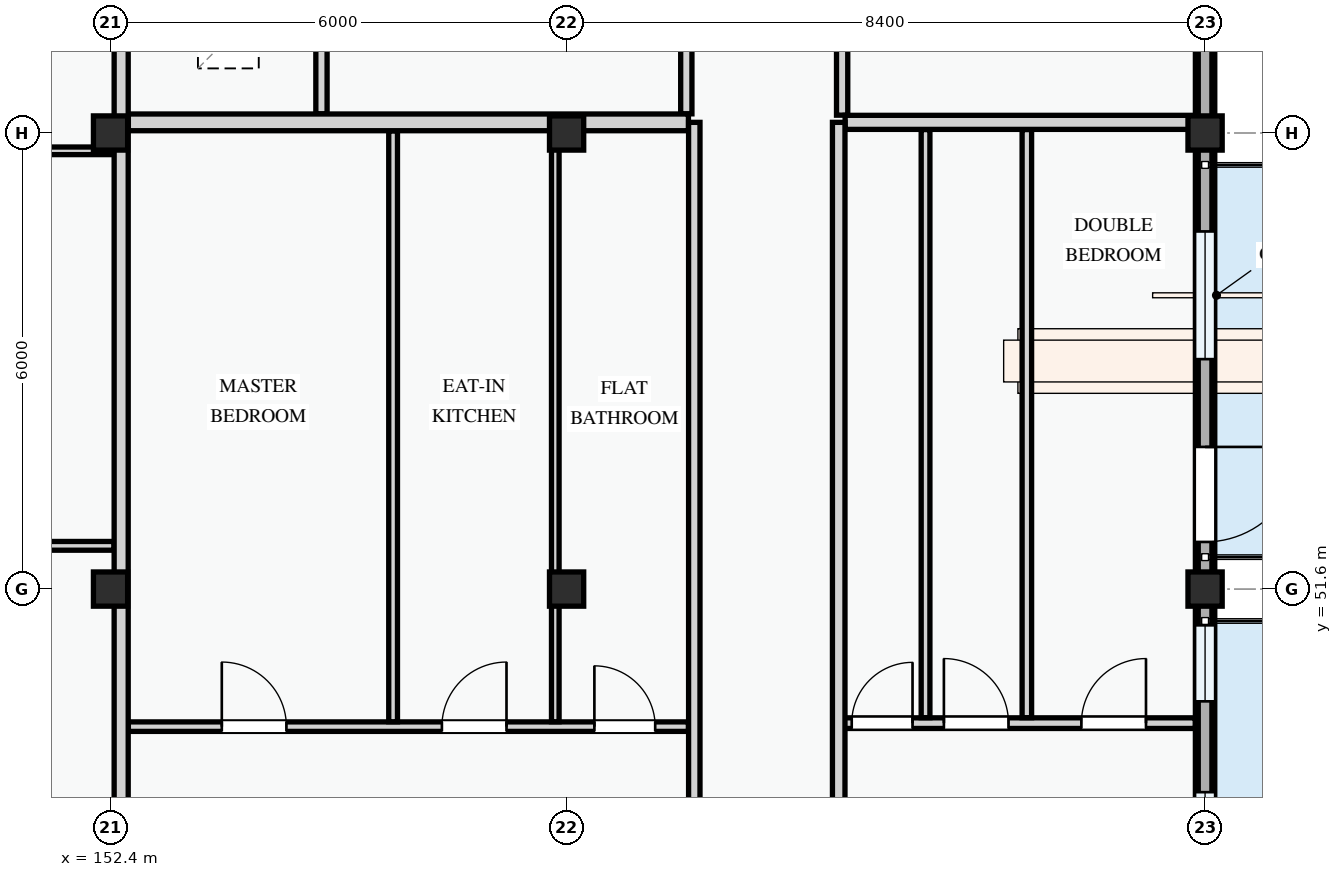
"""IFC4 building model, lengths in metres.
Left out: names, types, materials, properties, quantities, classifications, styles, units other than length and angle.
Written with IfcOpenShell. Run it as: python <this file> out.ifc"""

import sys

from ifc_helpers import new_model, si_unit, direction, frame, frame_2d, origin, origin_2d, place, context, subcontext, project, spatial, polyline, rectangle, outline, extrude, element, fill, save


model = new_model("IFC4")
c1 = context("Model", 3, precision=1e-05, world=origin(), true_north=direction((0.0, 1.0)))
c2 = subcontext(c1, "Body", "Model", "MODEL_VIEW")
j1 = project(units=[si_unit("LENGTHUNIT", "METRE"), si_unit("PLANEANGLEUNIT", "RADIAN")], contexts=[c1])
p1 = place(None, origin())
s1 = spatial("IfcSite", under=j1, at=p1, CompositionType="ELEMENT")
p2 = place(p1, origin())
s2 = spatial("IfcBuilding", under=s1, at=p2, CompositionType="ELEMENT")
p3 = place(p2, frame((0.0, 0.0, 27.9)))
s3 = spatial("IfcBuildingStorey", under=s2, at=p3, CompositionType="ELEMENT", Elevation=27.9)
for number, where, z_axis, x_axis in (
    (1, (152.4, 51.6, 0.0), (0.0, 0.0, 1.0), (1.0, 0.0, 0.0)),
    (2, (152.4, 57.6, 0.0), (0.0, 0.0, 1.0), (1.0, 0.0, 0.0)),
    (3, (158.4, 51.6, 0.0), (0.0, 0.0, 1.0), (1.0, 0.0, 0.0)),
    (4, (158.4, 57.6, 0.0), (0.0, 0.0, 1.0), (1.0, 0.0, 0.0)),
    (5, (166.8, 51.6, 0.0), (0.0, 0.0, 1.0), (1.0, 0.0, 0.0)),
    (6, (166.8, 57.6, 0.0), (0.0, 0.0, 1.0), (1.0, 0.0, 0.0)),
):
    element("IfcColumn", number, at=place(p3, frame(where, z_axis=z_axis, x_axis=x_axis)), inside=s3, PredefinedType="COLUMN", context=c2, shape_type="SweptSolid", body=[
        extrude(rectangle(XDim=0.45, YDim=0.45, at=origin_2d()), origin(), (0.0, 0.0, 1.0), 3.3),
    ])
p4 = place(p3, frame((166.8, 43.2, 0.0), z_axis=(0.0, 0.0, 1.0), x_axis=(0.0, 1.0, 0.0)))
e7 = element("IfcWall", 7, at=p4, inside=s3, PredefinedType="STANDARD", context=c2, shape_type="SweptSolid", body=[
    extrude(rectangle(XDim=8.4, YDim=0.255, at=frame_2d((4.2, 0.0))), origin(), (0.0, 0.0, 1.0), 2.345),
])
p5 = place(p4, frame((2.17, 0.0, 0.0)))
e8 = element("IfcOpeningElement", 8, at=p5, cuts=e7, PredefinedType="OPENING", context=c2, shape_type="SweptSolid", body=[
    extrude(rectangle(XDim=1.2, YDim=2.15, at=frame_2d((0.6, 1.075))), frame((0.0, 0.137, 0.0), z_axis=(0.0, -1.0, 0.0), x_axis=(1.0, 0.0, 0.0)), (0.0, 0.0, 1.0), 0.275),
])
p6 = place(p4, frame((0.565, 0.0, 0.78)))
e9 = element("IfcOpeningElement", 9, at=p6, cuts=e7, PredefinedType="OPENING", context=c2, shape_type="SweptSolid", body=[
    extrude(rectangle(XDim=0.9, YDim=1.2, at=frame_2d((0.45, 0.6))), frame((0.0, 0.137, 0.0), z_axis=(0.0, -1.0, 0.0), x_axis=(1.0, 0.0, 0.0)), (0.0, 0.0, 1.0), 0.275),
])
p7 = place(p4, frame((4.328, 0.0, 0.78)))
e10 = element("IfcOpeningElement", 10, at=p7, cuts=e7, PredefinedType="OPENING", context=c2, shape_type="SweptSolid", body=[
    extrude(rectangle(XDim=1.4, YDim=1.45, at=frame_2d((0.7, 0.725))), frame((0.0, 0.137, 0.0), z_axis=(0.0, -1.0, 0.0), x_axis=(1.0, 0.0, 0.0)), (0.0, 0.0, 1.0), 0.275),
])
p8 = place(p4, frame((6.923, 0.0, 0.78)))
e11 = element("IfcOpeningElement", 11, at=p8, cuts=e7, PredefinedType="OPENING", context=c2, shape_type="SweptSolid", body=[
    extrude(rectangle(XDim=1.0, YDim=1.25, at=frame_2d((0.5, 0.625))), frame((0.0, 0.137, 0.0), z_axis=(0.0, -1.0, 0.0), x_axis=(1.0, 0.0, 0.0)), (0.0, 0.0, 1.0), 0.275),
])
p9 = place(p3, frame((166.8, 51.6, 0.0), z_axis=(0.0, 0.0, 1.0), x_axis=(0.0, 1.0, 0.0)))
e12 = element("IfcWall", 12, at=p9, inside=s3, PredefinedType="STANDARD", context=c2, shape_type="SweptSolid", body=[
    extrude(rectangle(XDim=6.0, YDim=0.255, at=frame_2d((3.0, 0.0))), origin(), (0.0, 0.0, 1.0), 2.445),
])
p10 = place(p9, frame((0.62, 0.0, 0.0)))
e13 = element("IfcOpeningElement", 13, at=p10, cuts=e12, PredefinedType="OPENING", context=c2, shape_type="SweptSolid", body=[
    extrude(rectangle(XDim=1.25, YDim=2.2, at=frame_2d((0.625, 1.1))), frame((0.0, 0.137, 0.0), z_axis=(0.0, -1.0, 0.0), x_axis=(1.0, 0.0, 0.0)), (0.0, 0.0, 1.0), 0.275),
])
p11 = place(p9, frame((3.025, 0.0, 0.78)))
e14 = element("IfcOpeningElement", 14, at=p11, cuts=e12, PredefinedType="OPENING", context=c2, shape_type="SweptSolid", body=[
    extrude(rectangle(XDim=1.68, YDim=1.46, at=frame_2d((0.84, 0.73))), frame((0.0, 0.137, 0.0), z_axis=(0.0, -1.0, 0.0), x_axis=(1.0, 0.0, 0.0)), (0.0, 0.0, 1.0), 0.275),
])
p12 = place(p3, frame((166.8, 57.6, 0.0), z_axis=(0.0, 0.0, 1.0), x_axis=(0.0, 1.0, 0.0)))
e15 = element("IfcWall", 15, at=p12, inside=s3, PredefinedType="STANDARD", context=c2, shape_type="SweptSolid", body=[
    extrude(rectangle(XDim=8.4, YDim=0.255, at=frame_2d((4.2, 0.0))), origin(), (0.0, 0.0, 1.0), 2.345),
])
p13 = place(p12, frame((1.745, 0.0, 0.78)))
e16 = element("IfcOpeningElement", 16, at=p13, cuts=e15, PredefinedType="OPENING", context=c2, shape_type="SweptSolid", body=[
    extrude(rectangle(XDim=0.9, YDim=1.2, at=frame_2d((0.45, 0.6))), frame((0.0, 0.137, 0.0), z_axis=(0.0, -1.0, 0.0), x_axis=(1.0, 0.0, 0.0)), (0.0, 0.0, 1.0), 0.275),
])
p14 = place(p12, frame((5.188, 0.0, 0.78)))
e17 = element("IfcOpeningElement", 17, at=p14, cuts=e15, PredefinedType="OPENING", context=c2, shape_type="SweptSolid", body=[
    extrude(rectangle(XDim=0.95, YDim=1.15, at=frame_2d((0.475, 0.575))), frame((0.0, 0.137, 0.0), z_axis=(0.0, -1.0, 0.0), x_axis=(1.0, 0.0, 0.0)), (0.0, 0.0, 1.0), 0.275),
])
p15 = place(p3, frame((166.8, 43.2, 3.3), z_axis=(0.0, 0.0, 1.0), x_axis=(0.0, 1.0, 0.0)))
e18 = element("IfcWall", 18, at=p15, inside=s3, PredefinedType="PARAPET", context=c2, shape_type="SweptSolid", body=[
    extrude(outline(polyline([(0.0, 0.0), (8.4, 0.0), (8.4, 1.12), (7.7, 1.322), (7.0, 1.484), (6.3, 1.618), (5.6, 1.718), (4.9, 1.779), (4.2, 1.8), (3.5, 1.779), (2.8, 1.718), (2.1, 1.618), (1.4, 1.484), (0.7, 1.322), (0.0, 1.12), (0.0, 0.0)])), frame((0.0, 0.09, 0.0), z_axis=(0.0, -1.0, 0.0), x_axis=(1.0, 0.0, 0.0)), (0.0, 0.0, 1.0), 0.18),
])
p16 = place(p3, frame((166.8, 51.6, 3.3), z_axis=(0.0, 0.0, 1.0), x_axis=(0.0, 1.0, 0.0)))
e19 = element("IfcWall", 19, at=p16, inside=s3, PredefinedType="PARAPET", context=c2, shape_type="SweptSolid", body=[
    extrude(outline(polyline([(0.0, 0.0), (6.0, 0.0), (6.0, 1.12), (5.5, 1.322), (5.0, 1.484), (4.5, 1.618), (4.0, 1.718), (3.5, 1.779), (3.0, 1.8), (2.5, 1.779), (2.0, 1.718), (1.5, 1.618), (1.0, 1.484), (0.5, 1.322), (0.0, 1.12), (0.0, 0.0)])), frame((0.0, 0.09, 0.0), z_axis=(0.0, -1.0, 0.0), x_axis=(1.0, 0.0, 0.0)), (0.0, 0.0, 1.0), 0.18),
])
p17 = place(p3, frame((166.8, 57.6, 3.3), z_axis=(0.0, 0.0, 1.0), x_axis=(0.0, 1.0, 0.0)))
e20 = element("IfcWall", 20, at=p17, inside=s3, PredefinedType="PARAPET", context=c2, shape_type="SweptSolid", body=[
    extrude(outline(polyline([(0.0, 0.0), (8.4, 0.0), (8.4, 1.12), (7.7, 1.322), (7.0, 1.484), (6.3, 1.618), (5.6, 1.718), (4.9, 1.779), (4.2, 1.8), (3.5, 1.779), (2.8, 1.718), (2.1, 1.618), (1.4, 1.484), (0.7, 1.322), (0.0, 1.12), (0.0, 0.0)])), frame((0.0, 0.09, 0.0), z_axis=(0.0, -1.0, 0.0), x_axis=(1.0, 0.0, 0.0)), (0.0, 0.0, 1.0), 0.18),
])
for number, where, z_axis, x_axis in (
    (21, (155.175, 61.724, 0.0), (0.0, 0.0, 1.0), (0.0, -1.0, 0.0)),
    (22, (159.975, 61.724, 0.0), (0.0, 0.0, 1.0), (0.0, -1.0, 0.0)),
):
    element("IfcWall", number, at=place(p3, frame(where, z_axis=z_axis, x_axis=x_axis)), inside=s3, PredefinedType="PARTITIONING", context=c2, shape_type="SweptSolid", body=[
        extrude(rectangle(XDim=3.872, YDim=0.148, at=frame_2d((1.936, 0.0))), origin(), (0.0, 0.0, 1.0), 3.0),
    ])
p18 = place(p3, frame((162.025, 61.724, 0.0), z_axis=(0.0, 0.0, 1.0), x_axis=(0.0, -1.0, 0.0)))
e23 = element("IfcWall", 23, at=p18, inside=s3, PredefinedType="PARTITIONING", context=c2, shape_type="SweptSolid", body=[
    extrude(rectangle(XDim=3.89, YDim=0.148, at=frame_2d((1.945, 0.0))), origin(), (0.0, 0.0, 1.0), 3.0),
])
p19 = place(p3, frame((152.635, 49.79, 0.0), z_axis=(0.0, 0.0, 1.0), x_axis=(1.0, 0.0, 0.0)))
e24 = element("IfcWall", 24, at=p19, inside=s3, PredefinedType="PARTITIONING", context=c2, shape_type="SweptSolid", body=[
    extrude(rectangle(XDim=7.368, YDim=0.125, at=frame_2d((3.684, 0.0))), origin(), (0.0, 0.0, 1.0), 3.0),
])
p20 = place(p19, frame((1.229, 0.0, 0.0)))
e25 = element("IfcOpeningElement", 25, at=p20, cuts=e24, PredefinedType="OPENING", context=c2, shape_type="SweptSolid", body=[
    extrude(rectangle(XDim=0.85, YDim=2.1, at=frame_2d((0.425, 1.05))), frame((0.0, 0.073, 0.0), z_axis=(0.0, -1.0, 0.0), x_axis=(1.0, 0.0, 0.0)), (0.0, 0.0, 1.0), 0.145),
])
p21 = place(p19, frame((4.125, 0.0, 0.0)))
e26 = element("IfcOpeningElement", 26, at=p21, cuts=e24, PredefinedType="OPENING", context=c2, shape_type="SweptSolid", body=[
    extrude(rectangle(XDim=0.85, YDim=2.1, at=frame_2d((0.425, 1.05))), frame((0.0, 0.073, 0.0), z_axis=(0.0, -1.0, 0.0), x_axis=(1.0, 0.0, 0.0)), (0.0, 0.0, 1.0), 0.145),
])
p22 = place(p19, frame((6.131, 0.0, 0.0)))
e27 = element("IfcOpeningElement", 27, at=p22, cuts=e24, PredefinedType="OPENING", context=c2, shape_type="SweptSolid", body=[
    extrude(rectangle(XDim=0.8, YDim=2.1, at=frame_2d((0.4, 1.05))), frame((0.0, 0.073, 0.0), z_axis=(0.0, -1.0, 0.0), x_axis=(1.0, 0.0, 0.0)), (0.0, 0.0, 1.0), 0.145),
])
p23 = place(p3, frame((156.118, 49.854, 0.0), z_axis=(0.0, 0.0, 1.0), x_axis=(0.0, 1.0, 0.0)))
e28 = element("IfcWall", 28, at=p23, inside=s3, PredefinedType="PARTITIONING", context=c2, shape_type="SweptSolid", body=[
    extrude(rectangle(XDim=7.773, YDim=0.115, at=frame_2d((3.887, 0.0))), origin(), (0.0, 0.0, 1.0), 3.0),
])
p24 = place(p3, frame((158.251, 49.854, 0.0), z_axis=(0.0, 0.0, 1.0), x_axis=(0.0, 1.0, 0.0)))
e29 = element("IfcWall", 29, at=p24, inside=s3, PredefinedType="PARTITIONING", context=c2, shape_type="SweptSolid", body=[
    extrude(rectangle(XDim=7.773, YDim=0.1, at=frame_2d((3.887, 0.0))), origin(), (0.0, 0.0, 1.0), 2.425),
])
p25 = place(p3, frame((161.98, 49.836, 0.0), z_axis=(0.0, 0.0, 1.0), x_axis=(1.0, 0.0, 0.0)))
e30 = element("IfcWall", 30, at=p25, inside=s3, PredefinedType="PARTITIONING", context=c2, shape_type="SweptSolid", body=[
    extrude(rectangle(XDim=4.69, YDim=0.14, at=frame_2d((2.345, 0.0))), origin(), (0.0, 0.0, 1.0), 3.0),
])
p26 = place(p25, frame((0.171, 0.0, 0.0)))
e31 = element("IfcOpeningElement", 31, at=p26, cuts=e30, PredefinedType="OPENING", context=c2, shape_type="SweptSolid", body=[
    extrude(rectangle(XDim=0.8, YDim=2.1, at=frame_2d((0.4, 1.05))), frame((0.0, 0.08, 0.0), z_axis=(0.0, -1.0, 0.0), x_axis=(1.0, 0.0, 0.0)), (0.0, 0.0, 1.0), 0.16),
])
p27 = place(p25, frame((1.384, 0.0, 0.0)))
e32 = element("IfcOpeningElement", 32, at=p27, cuts=e30, PredefinedType="OPENING", context=c2, shape_type="SweptSolid", body=[
    extrude(rectangle(XDim=0.85, YDim=2.1, at=frame_2d((0.425, 1.05))), frame((0.0, 0.08, 0.0), z_axis=(0.0, -1.0, 0.0), x_axis=(1.0, 0.0, 0.0)), (0.0, 0.0, 1.0), 0.16),
])
p28 = place(p25, frame((3.193, 0.0, 0.0)))
e33 = element("IfcOpeningElement", 33, at=p28, cuts=e30, PredefinedType="OPENING", context=c2, shape_type="SweptSolid", body=[
    extrude(rectangle(XDim=0.85, YDim=2.1, at=frame_2d((0.425, 1.05))), frame((0.0, 0.08, 0.0), z_axis=(0.0, -1.0, 0.0), x_axis=(1.0, 0.0, 0.0)), (0.0, 0.0, 1.0), 0.16),
])
p29 = place(p3, frame((164.455, 49.908, 0.0), z_axis=(0.0, 0.0, 1.0), x_axis=(0.0, 1.0, 0.0)))
e34 = element("IfcWall", 34, at=p29, inside=s3, PredefinedType="PARTITIONING", context=c2, shape_type="SweptSolid", body=[
    extrude(rectangle(XDim=7.738, YDim=0.125, at=frame_2d((3.869, 0.0))), origin(), (0.0, 0.0, 1.0), 3.0),
])
p30 = place(p3, frame((163.122, 49.908, 0.0), z_axis=(0.0, 0.0, 1.0), x_axis=(0.0, 1.0, 0.0)))
e35 = element("IfcWall", 35, at=p30, inside=s3, PredefinedType="PARTITIONING", context=c2, shape_type="SweptSolid", body=[
    extrude(rectangle(XDim=7.738, YDim=0.115, at=frame_2d((3.869, 0.0))), origin(), (0.0, 0.0, 1.0), 3.0),
])
p31 = place(p3, frame((152.635, 57.74, 0.0), z_axis=(0.0, 0.0, 1.0), x_axis=(1.0, 0.0, 0.0)))
e36 = element("IfcWall", 36, at=p31, inside=s3, PredefinedType="PARTITIONING", context=c2, shape_type="SweptSolid", body=[
    extrude(rectangle(XDim=7.368, YDim=0.22, at=frame_2d((3.684, 0.0))), origin(), (0.0, 0.0, 1.0), 2.375),
])
p32 = place(p3, frame((162.064, 57.74, 0.0), z_axis=(0.0, 0.0, 1.0), x_axis=(1.0, 0.0, 0.0)))
e37 = element("IfcWall", 37, at=p32, inside=s3, PredefinedType="PARTITIONING", context=c2, shape_type="SweptSolid", body=[
    extrude(rectangle(XDim=4.606, YDim=0.185, at=frame_2d((2.303, 0.0))), origin(), (0.0, 0.0, 1.0), 2.375),
])
p33 = place(p3, frame((160.08, 37.33, 0.0), z_axis=(0.0, 0.0, 1.0), x_axis=(0.0, 1.0, 0.0)))
e38 = element("IfcWall", 38, at=p33, inside=s3, PredefinedType="PARTITIONING", context=c2, shape_type="SweptSolid", body=[
    extrude(rectangle(XDim=20.41, YDim=0.15, at=frame_2d((10.205, 0.0))), origin(), (0.0, 0.0, 1.0), 3.0),
])
p34 = place(p33, frame((2.383, 0.0, 0.0)))
e39 = element("IfcOpeningElement", 39, at=p34, cuts=e38, PredefinedType="OPENING", context=c2, shape_type="SweptSolid", body=[
    extrude(rectangle(XDim=0.96, YDim=2.12, at=frame_2d((0.48, 1.06))), frame((0.0, 0.085, 0.0), z_axis=(0.0, -1.0, 0.0), x_axis=(1.0, 0.0, 0.0)), (0.0, 0.0, 1.0), 0.17),
])
p35 = place(p33, frame((9.605, 0.0, 0.0)))
e40 = element("IfcOpeningElement", 40, at=p35, cuts=e38, PredefinedType="OPENING", context=c2, shape_type="SweptSolid", body=[
    extrude(rectangle(XDim=0.92, YDim=2.1, at=frame_2d((0.46, 1.05))), frame((0.0, 0.085, 0.0), z_axis=(0.0, -1.0, 0.0), x_axis=(1.0, 0.0, 0.0)), (0.0, 0.0, 1.0), 0.17),
])
p36 = place(p3, frame((161.98, 37.33, 0.0), z_axis=(0.0, 0.0, 1.0), x_axis=(0.0, 1.0, 0.0)))
e41 = element("IfcWall", 41, at=p36, inside=s3, PredefinedType="PARTITIONING", context=c2, shape_type="SweptSolid", body=[
    extrude(rectangle(XDim=20.41, YDim=0.165, at=frame_2d((10.205, 0.0))), origin(), (0.0, 0.0, 1.0), 3.0),
])
p37 = place(p36, frame((2.384, 0.0, 0.0)))
e42 = element("IfcOpeningElement", 42, at=p37, cuts=e41, PredefinedType="OPENING", context=c2, shape_type="SweptSolid", body=[
    extrude(rectangle(XDim=0.92, YDim=2.1, at=frame_2d((0.46, 1.05))), frame((0.0, 0.093, 0.0), z_axis=(0.0, -1.0, 0.0), x_axis=(1.0, 0.0, 0.0)), (0.0, 0.0, 1.0), 0.185),
])
p38 = place(p36, frame((9.628, 0.0, 0.0)))
e43 = element("IfcOpeningElement", 43, at=p38, cuts=e41, PredefinedType="OPENING", context=c2, shape_type="SweptSolid", body=[
    extrude(rectangle(XDim=0.92, YDim=2.1, at=frame_2d((0.46, 1.05))), frame((0.0, 0.093, 0.0), z_axis=(0.0, -1.0, 0.0), x_axis=(1.0, 0.0, 0.0)), (0.0, 0.0, 1.0), 0.185),
])
p39 = place(p3, frame((145.865, 52.169, 0.0), z_axis=(0.0, 0.0, 1.0), x_axis=(1.0, 0.0, 0.0)))
e44 = element("IfcWall", 44, at=p39, inside=s3, PredefinedType="PARTITIONING", context=c2, shape_type="SweptSolid", body=[
    extrude(rectangle(XDim=6.581, YDim=0.115, at=frame_2d((3.291, 0.0))), origin(), (0.0, 0.0, 1.0), 3.0),
])
p40 = place(p3, frame((145.865, 57.365, 0.0), z_axis=(0.0, 0.0, 1.0), x_axis=(1.0, 0.0, 0.0)))
e45 = element("IfcWall", 45, at=p40, inside=s3, PredefinedType="PARTITIONING", context=c2, shape_type="SweptSolid", body=[
    extrude(rectangle(XDim=6.581, YDim=0.1, at=frame_2d((3.291, 0.0))), origin(), (0.0, 0.0, 1.0), 2.375),
])
p41 = place(p3, frame((152.54, 43.26, 0.0), z_axis=(0.0, 0.0, 1.0), x_axis=(0.0, 1.0, 0.0)))
e46 = element("IfcWall", 46, at=p41, inside=s3, PredefinedType="PARTITIONING", context=c2, shape_type="SweptSolid", body=[
    extrude(rectangle(XDim=18.464, YDim=0.185, at=frame_2d((9.232, 0.0))), origin(), (0.0, 0.0, 1.0), 2.425),
])
p42 = place(p7, origin())
e47 = element("IfcWindow", 47, at=p42, inside=s3, PartitioningType="SINGLE_PANEL", PredefinedType="WINDOW", context=c2, shape_type="SweptSolid", body=[
    extrude(rectangle(XDim=1.4, YDim=1.45, at=frame_2d((0.7, 0.725))), frame((0.0, 0.03, 0.0), z_axis=(0.0, -1.0, 0.0), x_axis=(1.0, 0.0, 0.0)), (0.0, 0.0, 1.0), 0.06),
])
fill(e10, e47)
p43 = place(p8, origin())
e48 = element("IfcWindow", 48, at=p43, inside=s3, PartitioningType="SINGLE_PANEL", PredefinedType="WINDOW", context=c2, shape_type="SweptSolid", body=[
    extrude(rectangle(XDim=1.0, YDim=1.25, at=frame_2d((0.5, 0.625))), frame((0.0, 0.03, 0.0), z_axis=(0.0, -1.0, 0.0), x_axis=(1.0, 0.0, 0.0)), (0.0, 0.0, 1.0), 0.06),
])
fill(e11, e48)
p44 = place(p10, frame((1.25, 0.0, 0.0), z_axis=(0.0, 0.0, 1.0), x_axis=(-1.0, 0.0, 0.0)))
e49 = element("IfcDoor", 49, at=p44, inside=s3, OperationType="SINGLE_SWING_LEFT", PredefinedType="DOOR", context=c2, shape_type="SweptSolid", body=[
    extrude(rectangle(XDim=1.25, YDim=2.2, at=frame_2d((0.625, 1.1))), frame((0.0, 0.025, 0.0), z_axis=(0.0, -1.0, 0.0), x_axis=(1.0, 0.0, 0.0)), (0.0, 0.0, 1.0), 0.05),
])
fill(e13, e49)
p45 = place(p11, origin())
e50 = element("IfcWindow", 50, at=p45, inside=s3, PartitioningType="DOUBLE_PANEL_VERTICAL", PredefinedType="WINDOW", context=c2, shape_type="SweptSolid", body=[
    extrude(rectangle(XDim=1.68, YDim=1.46, at=frame_2d((0.84, 0.73))), frame((0.0, 0.03, 0.0), z_axis=(0.0, -1.0, 0.0), x_axis=(1.0, 0.0, 0.0)), (0.0, 0.0, 1.0), 0.06),
])
fill(e14, e50)
p46 = place(p20, origin())
e51 = element("IfcDoor", 51, at=p46, inside=s3, OperationType="SINGLE_SWING_LEFT", PredefinedType="DOOR", context=c2, shape_type="SweptSolid", body=[
    extrude(rectangle(XDim=0.85, YDim=2.1, at=frame_2d((0.425, 1.05))), frame((0.0, 0.025, 0.0), z_axis=(0.0, -1.0, 0.0), x_axis=(1.0, 0.0, 0.0)), (0.0, 0.0, 1.0), 0.05),
])
fill(e25, e51)
p47 = place(p21, origin())
e52 = element("IfcDoor", 52, at=p47, inside=s3, OperationType="SINGLE_SWING_RIGHT", PredefinedType="DOOR", context=c2, shape_type="SweptSolid", body=[
    extrude(rectangle(XDim=0.85, YDim=2.1, at=frame_2d((0.425, 1.05))), frame((0.0, 0.025, 0.0), z_axis=(0.0, -1.0, 0.0), x_axis=(1.0, 0.0, 0.0)), (0.0, 0.0, 1.0), 0.05),
])
fill(e26, e52)
p48 = place(p22, origin())
e53 = element("IfcDoor", 53, at=p48, inside=s3, OperationType="SINGLE_SWING_LEFT", PredefinedType="DOOR", context=c2, shape_type="SweptSolid", body=[
    extrude(rectangle(XDim=0.8, YDim=2.1, at=frame_2d((0.4, 1.05))), frame((0.0, 0.025, 0.0), z_axis=(0.0, -1.0, 0.0), x_axis=(1.0, 0.0, 0.0)), (0.0, 0.0, 1.0), 0.05),
])
fill(e27, e53)
p49 = place(p26, origin())
e54 = element("IfcDoor", 54, at=p49, inside=s3, OperationType="SINGLE_SWING_RIGHT", PredefinedType="DOOR", context=c2, shape_type="SweptSolid", body=[
    extrude(rectangle(XDim=0.8, YDim=2.1, at=frame_2d((0.4, 1.05))), frame((0.0, 0.025, 0.0), z_axis=(0.0, -1.0, 0.0), x_axis=(1.0, 0.0, 0.0)), (0.0, 0.0, 1.0), 0.05),
])
fill(e31, e54)
p50 = place(p27, origin())
e55 = element("IfcDoor", 55, at=p50, inside=s3, OperationType="SINGLE_SWING_LEFT", PredefinedType="DOOR", context=c2, shape_type="SweptSolid", body=[
    extrude(rectangle(XDim=0.85, YDim=2.1, at=frame_2d((0.425, 1.05))), frame((0.0, 0.025, 0.0), z_axis=(0.0, -1.0, 0.0), x_axis=(1.0, 0.0, 0.0)), (0.0, 0.0, 1.0), 0.05),
])
fill(e32, e55)
p51 = place(p28, origin())
e56 = element("IfcDoor", 56, at=p51, inside=s3, OperationType="SINGLE_SWING_RIGHT", PredefinedType="DOOR", context=c2, shape_type="SweptSolid", body=[
    extrude(rectangle(XDim=0.85, YDim=2.1, at=frame_2d((0.425, 1.05))), frame((0.0, 0.025, 0.0), z_axis=(0.0, -1.0, 0.0), x_axis=(1.0, 0.0, 0.0)), (0.0, 0.0, 1.0), 0.05),
])
fill(e33, e56)
save(model, sys.argv[1])
